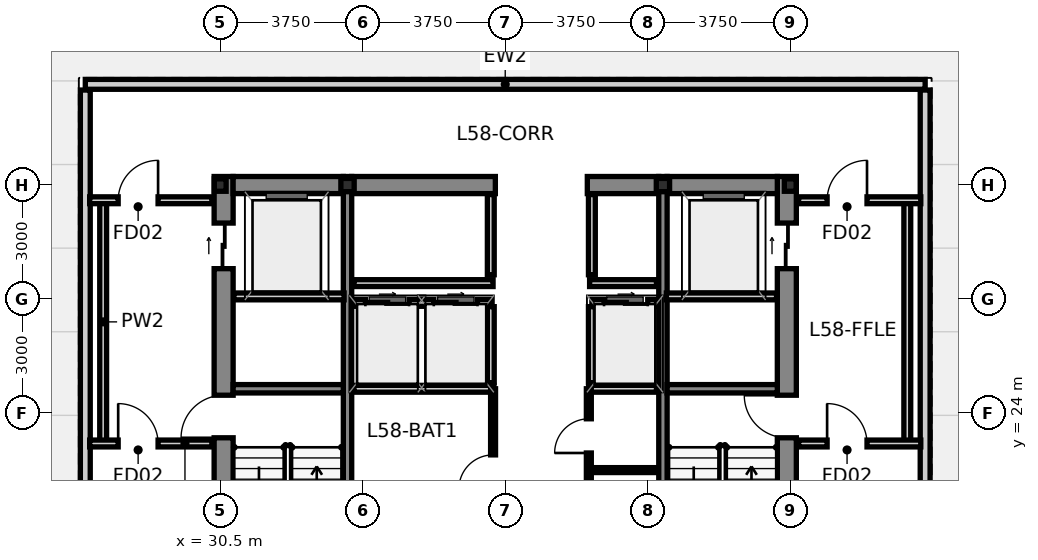
"""IFC4 building model, lengths in metres.
Left out: names, types, materials, properties, quantities, classifications, styles, units other than length and angle.
Written with IfcOpenShell. Run it as: python <this file> out.ifc"""

import sys

from ifc_helpers import new_model, si_unit, direction, frame, frame_2d, origin, origin_2d, place, context, subcontext, project, spatial, rectangle, hollow_rectangle, i_section, extrude, source, transform, mapped, element, fill, save


model = new_model("IFC4")
c1 = context("Model", 3, precision=1e-05, world=origin(), true_north=direction((0.0, 1.0)))
c2 = subcontext(c1, "Body", "Model", "MODEL_VIEW")
j1 = project(units=[si_unit("LENGTHUNIT", "METRE"), si_unit("PLANEANGLEUNIT", "RADIAN")], contexts=[c1])
p1 = place(None, origin())
s1 = spatial("IfcSite", under=j1, at=p1, CompositionType="ELEMENT")
p2 = place(p1, origin())
s2 = spatial("IfcBuilding", under=s1, at=p2, CompositionType="ELEMENT")
p3 = place(p2, frame((0.0, 0.0, 220.55)))
s3 = spatial("IfcBuildingStorey", under=s2, at=p3, CompositionType="ELEMENT", Elevation=220.55)
m1 = source(origin(), c2, "Body", "SweptSolid", [
    extrude(i_section(OverallWidth=0.311, OverallDepth=0.327, WebThickness=0.016, FlangeThickness=0.025, at=origin_2d()), origin(), (0.0, 0.0, 1.0), 4.8),
])
for number, where, z_axis, x_axis in (
    (1, (45.5, 30.0, 0.0), (0.0, 0.0, 1.0), (1.0, 0.0, 0.0)),
    (2, (30.5, 30.0, 0.0), (0.0, 0.0, 1.0), (1.0, 0.0, 0.0)),
):
    element("IfcColumn", number, at=place(p3, frame(where, z_axis=z_axis, x_axis=x_axis)), inside=s3, PredefinedType="COLUMN", context=c2, shape_type="MappedRepresentation", body=[
        mapped(m1, transform((0.0, 0.0, 0.0), scale=1.0)),
    ])
m2 = source(origin(), c2, "Body", "SweptSolid", [
    extrude(hollow_rectangle(XDim=0.35, YDim=0.35, WallThickness=0.016, at=origin_2d()), origin(), (0.0, 0.0, 1.0), 4.8),
])
for number, where, z_axis, x_axis in (
    (3, (33.85, 30.0, 0.0), (0.0, 0.0, 1.0), (1.0, 0.0, 0.0)),
    (4, (42.15, 30.0, 0.0), (0.0, 0.0, 1.0), (1.0, 0.0, 0.0)),
):
    element("IfcColumn", number, at=place(p3, frame(where, z_axis=z_axis, x_axis=x_axis)), inside=s3, PredefinedType="COLUMN", context=c2, shape_type="MappedRepresentation", body=[
        mapped(m2, transform((0.0, 0.0, 0.0), scale=1.0)),
    ])
p4 = place(p3, frame((30.59, 16.95, 0.0), z_axis=(0.0, 0.0, 1.0), x_axis=(0.0, 1.0, 0.0)))
e5 = element("IfcWall", 5, at=p4, inside=s3, PredefinedType="SHEAR", context=c2, shape_type="SweptSolid", body=[
    extrude(rectangle(XDim=13.275, YDim=0.5, at=frame_2d((6.638, 0.0))), origin(), (0.0, 0.0, 1.0), 4.8),
])
p5 = place(p4, frame((6.4, 0.0, 0.0)))
e6 = element("IfcOpeningElement", 6, at=p5, cuts=e5, PredefinedType="OPENING", context=c2, shape_type="SweptSolid", body=[
    extrude(rectangle(XDim=1.12, YDim=2.15, at=frame_2d((0.56, 1.075))), frame((0.0, 0.262, 0.0), z_axis=(0.0, -1.0, 0.0), x_axis=(1.0, 0.0, 0.0)), (0.0, 0.0, 1.0), 0.524),
])
p6 = place(p4, frame((10.85, 0.0, 0.0)))
e7 = element("IfcOpeningElement", 7, at=p6, cuts=e5, PredefinedType="OPENING", context=c2, shape_type="SweptSolid", body=[
    extrude(rectangle(XDim=1.2, YDim=2.2, at=frame_2d((0.6, 1.1))), frame((0.0, 0.262, 0.0), z_axis=(0.0, -1.0, 0.0), x_axis=(1.0, 0.0, 0.0)), (0.0, 0.0, 1.0), 0.524),
])
p7 = place(p3, frame((45.41, 16.95, 0.0), z_axis=(0.0, 0.0, 1.0), x_axis=(0.0, 1.0, 0.0)))
e8 = element("IfcWall", 8, at=p7, inside=s3, PredefinedType="SHEAR", context=c2, shape_type="SweptSolid", body=[
    extrude(rectangle(XDim=13.275, YDim=0.5, at=frame_2d((6.638, 0.0))), origin(), (0.0, 0.0, 1.0), 4.8),
])
p8 = place(p7, frame((6.4, 0.0, 0.0)))
e9 = element("IfcOpeningElement", 9, at=p8, cuts=e8, PredefinedType="OPENING", context=c2, shape_type="SweptSolid", body=[
    extrude(rectangle(XDim=1.12, YDim=2.15, at=frame_2d((0.56, 1.075))), frame((0.0, 0.262, 0.0), z_axis=(0.0, -1.0, 0.0), x_axis=(1.0, 0.0, 0.0)), (0.0, 0.0, 1.0), 0.524),
])
p9 = place(p7, frame((10.85, 0.0, 0.0)))
e10 = element("IfcOpeningElement", 10, at=p9, cuts=e8, PredefinedType="OPENING", context=c2, shape_type="SweptSolid", body=[
    extrude(rectangle(XDim=1.2, YDim=2.2, at=frame_2d((0.6, 1.1))), frame((0.0, 0.262, 0.0), z_axis=(0.0, -1.0, 0.0), x_axis=(1.0, 0.0, 0.0)), (0.0, 0.0, 1.0), 0.524),
])
p10 = place(p3, frame((30.84, 30.0, 0.0), z_axis=(0.0, 0.0, 1.0), x_axis=(1.0, 0.0, 0.0)))
e11 = element("IfcWall", 11, at=p10, inside=s3, PredefinedType="SHEAR", context=c2, shape_type="SweptSolid", body=[
    extrude(rectangle(XDim=2.9, YDim=0.45, at=frame_2d((1.45, 0.0))), origin(), (0.0, 0.0, 1.0), 4.8),
])
p11 = place(p3, frame((33.96, 30.0, 0.0), z_axis=(0.0, 0.0, 1.0), x_axis=(1.0, 0.0, 0.0)))
e12 = element("IfcWall", 12, at=p11, inside=s3, PredefinedType="SHEAR", context=c2, shape_type="SweptSolid", body=[
    extrude(rectangle(XDim=3.78, YDim=0.45, at=frame_2d((1.89, 0.0))), origin(), (0.0, 0.0, 1.0), 4.8),
])
p12 = place(p3, frame((40.16, 30.0, 0.0), z_axis=(0.0, 0.0, 1.0), x_axis=(1.0, 0.0, 0.0)))
e13 = element("IfcWall", 13, at=p12, inside=s3, PredefinedType="SHEAR", context=c2, shape_type="SweptSolid", body=[
    extrude(rectangle(XDim=1.88, YDim=0.45, at=frame_2d((0.94, 0.0))), origin(), (0.0, 0.0, 1.0), 4.8),
])
p13 = place(p3, frame((42.26, 30.0, 0.0), z_axis=(0.0, 0.0, 1.0), x_axis=(1.0, 0.0, 0.0)))
e14 = element("IfcWall", 14, at=p13, inside=s3, PredefinedType="SHEAR", context=c2, shape_type="SweptSolid", body=[
    extrude(rectangle(XDim=2.9, YDim=0.45, at=frame_2d((1.45, 0.0))), origin(), (0.0, 0.0, 1.0), 4.8),
])
for number, where, z_axis, x_axis in (
    (15, (33.85, 16.95, 0.0), (0.0, 0.0, 1.0), (0.0, 1.0, 0.0)),
    (16, (42.15, 16.95, 0.0), (0.0, 0.0, 1.0), (0.0, 1.0, 0.0)),
):
    element("IfcWall", number, at=place(p3, frame(where, z_axis=z_axis, x_axis=x_axis)), inside=s3, PredefinedType="SHEAR", context=c2, shape_type="SweptSolid", body=[
        extrude(rectangle(XDim=13.275, YDim=0.22, at=frame_2d((6.638, 0.0))), origin(), (0.0, 0.0, 1.0), 4.8),
    ])
for number, where, z_axis, x_axis in (
    (17, (30.84, 24.64, 0.0), (0.0, 0.0, 1.0), (1.0, 0.0, 0.0)),
    (18, (42.26, 24.64, 0.0), (0.0, 0.0, 1.0), (1.0, 0.0, 0.0)),
):
    element("IfcWall", number, at=place(p3, frame(where, z_axis=z_axis, x_axis=x_axis)), inside=s3, PredefinedType="SHEAR", context=c2, shape_type="SweptSolid", body=[
        extrude(rectangle(XDim=2.9, YDim=0.22, at=frame_2d((1.45, 0.0))), origin(), (0.0, 0.0, 1.0), 4.8),
    ])
p14 = place(p3, frame((26.95, 32.65, 0.0), z_axis=(0.0, 0.0, 1.0), x_axis=(1.0, 0.0, 0.0)))
e19 = element("IfcWall", 19, at=p14, inside=s3, PredefinedType="STANDARD", context=c2, shape_type="SweptSolid", body=[
    extrude(rectangle(XDim=22.1, YDim=0.26, at=frame_2d((11.05, 0.0))), origin(), (0.0, 0.0, 1.0), 4.228),
])
p15 = place(p3, frame((26.95, 15.5, 0.0), z_axis=(0.0, 0.0, 1.0), x_axis=(0.0, 1.0, 0.0)))
e20 = element("IfcWall", 20, at=p15, inside=s3, PredefinedType="STANDARD", context=c2, shape_type="SweptSolid", body=[
    extrude(rectangle(XDim=17.0, YDim=0.26, at=frame_2d((8.5, 0.0))), origin(), (0.0, 0.0, 1.0), 4.228),
])
p16 = place(p15, frame((3.5, 0.0, 0.0)))
e21 = element("IfcOpeningElement", 21, at=p16, cuts=e20, PredefinedType="OPENING", context=c2, shape_type="SweptSolid", body=[
    extrude(rectangle(XDim=1.1, YDim=2.2, at=frame_2d((0.55, 1.1))), frame((0.0, 0.142, 0.0), z_axis=(0.0, -1.0, 0.0), x_axis=(1.0, 0.0, 0.0)), (0.0, 0.0, 1.0), 0.284),
])
p17 = place(p3, frame((49.05, 15.5, 0.0), z_axis=(0.0, 0.0, 1.0), x_axis=(0.0, 1.0, 0.0)))
e22 = element("IfcWall", 22, at=p17, inside=s3, PredefinedType="STANDARD", context=c2, shape_type="SweptSolid", body=[
    extrude(rectangle(XDim=17.0, YDim=0.26, at=frame_2d((8.5, 0.0))), origin(), (0.0, 0.0, 1.0), 4.228),
])
p18 = place(p17, frame((3.5, 0.0, 0.0)))
e23 = element("IfcOpeningElement", 23, at=p18, cuts=e22, PredefinedType="OPENING", context=c2, shape_type="SweptSolid", body=[
    extrude(rectangle(XDim=1.1, YDim=2.2, at=frame_2d((0.55, 1.1))), frame((0.0, 0.142, 0.0), z_axis=(0.0, -1.0, 0.0), x_axis=(1.0, 0.0, 0.0)), (0.0, 0.0, 1.0), 0.284),
])
p19 = place(p3, frame((34.02, 26.9, 0.0), z_axis=(0.0, 0.0, 1.0), x_axis=(1.0, 0.0, 0.0)))
e24 = element("IfcWall", 24, at=p19, inside=s3, PredefinedType="PARTITIONING", context=c2, shape_type="SweptSolid", body=[
    extrude(rectangle(XDim=3.6, YDim=0.18, at=frame_2d((1.8, 0.0))), origin(), (0.0, 0.0, 1.0), 4.55),
])
p20 = place(p19, frame((0.3, 0.0, 0.0)))
e25 = element("IfcOpeningElement", 25, at=p20, cuts=e24, PredefinedType="OPENING", context=c2, shape_type="SweptSolid", body=[
    extrude(rectangle(XDim=1.15, YDim=2.2, at=frame_2d((0.575, 1.1))), frame((0.0, 0.102, 0.0), z_axis=(0.0, -1.0, 0.0), x_axis=(1.0, 0.0, 0.0)), (0.0, 0.0, 1.0), 0.204),
])
p21 = place(p19, frame((2.1, 0.0, 0.0)))
e26 = element("IfcOpeningElement", 26, at=p21, cuts=e24, PredefinedType="OPENING", context=c2, shape_type="SweptSolid", body=[
    extrude(rectangle(XDim=1.15, YDim=2.2, at=frame_2d((0.575, 1.1))), frame((0.0, 0.102, 0.0), z_axis=(0.0, -1.0, 0.0), x_axis=(1.0, 0.0, 0.0)), (0.0, 0.0, 1.0), 0.204),
])
p22 = place(p3, frame((40.28, 26.9, 0.0), z_axis=(0.0, 0.0, 1.0), x_axis=(1.0, 0.0, 0.0)))
e27 = element("IfcWall", 27, at=p22, inside=s3, PredefinedType="PARTITIONING", context=c2, shape_type="SweptSolid", body=[
    extrude(rectangle(XDim=1.7, YDim=0.18, at=frame_2d((0.85, 0.0))), origin(), (0.0, 0.0, 1.0), 4.55),
])
p23 = place(p22, frame((0.32, 0.0, 0.0)))
e28 = element("IfcOpeningElement", 28, at=p23, cuts=e27, PredefinedType="OPENING", context=c2, shape_type="SweptSolid", body=[
    extrude(rectangle(XDim=1.15, YDim=2.2, at=frame_2d((0.575, 1.1))), frame((0.0, 0.102, 0.0), z_axis=(0.0, -1.0, 0.0), x_axis=(1.0, 0.0, 0.0)), (0.0, 0.0, 1.0), 0.204),
])
for number, where, z_axis, x_axis in (
    (29, (37.62, 24.8, 0.0), (0.0, 0.0, 1.0), (0.0, 1.0, 0.0)),
    (30, (40.28, 24.8, 0.0), (0.0, 0.0, 1.0), (0.0, 1.0, 0.0)),
):
    element("IfcWall", number, at=place(p3, frame(where, z_axis=z_axis, x_axis=x_axis)), inside=s3, PredefinedType="PARTITIONING", context=c2, shape_type="SweptSolid", body=[
        extrude(rectangle(XDim=2.0, YDim=0.18, at=frame_2d((1.0, 0.0))), origin(), (0.0, 0.0, 1.0), 4.55),
    ])
p24 = place(p3, frame((34.02, 24.64, 0.0), z_axis=(0.0, 0.0, 1.0), x_axis=(1.0, 0.0, 0.0)))
e31 = element("IfcWall", 31, at=p24, inside=s3, PredefinedType="PARTITIONING", context=c2, shape_type="SweptSolid", body=[
    extrude(rectangle(XDim=3.68, YDim=0.18, at=frame_2d((1.84, 0.0))), origin(), (0.0, 0.0, 1.0), 4.55),
])
p25 = place(p3, frame((40.2, 24.64, 0.0), z_axis=(0.0, 0.0, 1.0), x_axis=(1.0, 0.0, 0.0)))
e32 = element("IfcWall", 32, at=p25, inside=s3, PredefinedType="PARTITIONING", context=c2, shape_type="SweptSolid", body=[
    extrude(rectangle(XDim=1.78, YDim=0.18, at=frame_2d((0.89, 0.0))), origin(), (0.0, 0.0, 1.0), 4.55),
])
p26 = place(p3, frame((34.02, 27.42, 0.0), z_axis=(0.0, 0.0, 1.0), x_axis=(1.0, 0.0, 0.0)))
e33 = element("IfcWall", 33, at=p26, inside=s3, PredefinedType="PARTITIONING", context=c2, shape_type="SweptSolid", body=[
    extrude(rectangle(XDim=3.66, YDim=0.18, at=frame_2d((1.83, 0.0))), origin(), (0.0, 0.0, 1.0), 4.55),
])
p27 = place(p3, frame((40.22, 27.42, 0.0), z_axis=(0.0, 0.0, 1.0), x_axis=(1.0, 0.0, 0.0)))
e34 = element("IfcWall", 34, at=p27, inside=s3, PredefinedType="PARTITIONING", context=c2, shape_type="SweptSolid", body=[
    extrude(rectangle(XDim=1.76, YDim=0.18, at=frame_2d((0.88, 0.0))), origin(), (0.0, 0.0, 1.0), 4.55),
])
for number, where, z_axis, x_axis in (
    (35, (37.62, 27.64, 0.0), (0.0, 0.0, 1.0), (0.0, 1.0, 0.0)),
    (36, (40.28, 27.64, 0.0), (0.0, 0.0, 1.0), (0.0, 1.0, 0.0)),
):
    element("IfcWall", number, at=place(p3, frame(where, z_axis=z_axis, x_axis=x_axis)), inside=s3, PredefinedType="PARTITIONING", context=c2, shape_type="SweptSolid", body=[
        extrude(rectangle(XDim=2.11, YDim=0.18, at=frame_2d((1.055, 0.0))), origin(), (0.0, 0.0, 1.0), 4.55),
    ])
p28 = place(p3, frame((27.42, 23.2, 0.0), z_axis=(0.0, 0.0, 1.0), x_axis=(0.0, 1.0, 0.0)))
e37 = element("IfcWall", 37, at=p28, inside=s3, PredefinedType="PARTITIONING", context=c2, shape_type="SweptSolid", body=[
    extrude(rectangle(XDim=6.4, YDim=0.18, at=frame_2d((3.2, 0.0))), origin(), (0.0, 0.0, 1.0), 4.228),
])
p29 = place(p3, frame((27.065, 23.2, 0.0), z_axis=(0.0, 0.0, 1.0), x_axis=(1.0, 0.0, 0.0)))
e38 = element("IfcWall", 38, at=p29, inside=s3, PredefinedType="PARTITIONING", context=c2, shape_type="SweptSolid", body=[
    extrude(rectangle(XDim=3.215, YDim=0.18, at=frame_2d((1.607, 0.0))), origin(), (0.0, 0.0, 1.0), 4.55),
])
p30 = place(p29, frame((0.75, 0.0, 0.0)))
e39 = element("IfcOpeningElement", 39, at=p30, cuts=e38, PredefinedType="OPENING", context=c2, shape_type="SweptSolid", body=[
    extrude(rectangle(XDim=1.05, YDim=2.15, at=frame_2d((0.525, 1.075))), frame((0.0, 0.102, 0.0), z_axis=(0.0, -1.0, 0.0), x_axis=(1.0, 0.0, 0.0)), (0.0, 0.0, 1.0), 0.204),
])
p31 = place(p3, frame((27.065, 29.6, 0.0), z_axis=(0.0, 0.0, 1.0), x_axis=(1.0, 0.0, 0.0)))
e40 = element("IfcWall", 40, at=p31, inside=s3, PredefinedType="PARTITIONING", context=c2, shape_type="SweptSolid", body=[
    extrude(rectangle(XDim=3.215, YDim=0.18, at=frame_2d((1.607, 0.0))), origin(), (0.0, 0.0, 1.0), 4.074),
])
p32 = place(p31, frame((0.75, 0.0, 0.0)))
e41 = element("IfcOpeningElement", 41, at=p32, cuts=e40, PredefinedType="OPENING", context=c2, shape_type="SweptSolid", body=[
    extrude(rectangle(XDim=1.05, YDim=2.15, at=frame_2d((0.525, 1.075))), frame((0.0, 0.102, 0.0), z_axis=(0.0, -1.0, 0.0), x_axis=(1.0, 0.0, 0.0)), (0.0, 0.0, 1.0), 0.204),
])
p33 = place(p3, frame((48.58, 23.2, 0.0), z_axis=(0.0, 0.0, 1.0), x_axis=(0.0, 1.0, 0.0)))
e42 = element("IfcWall", 42, at=p33, inside=s3, PredefinedType="PARTITIONING", context=c2, shape_type="SweptSolid", body=[
    extrude(rectangle(XDim=6.4, YDim=0.18, at=frame_2d((3.2, 0.0))), origin(), (0.0, 0.0, 1.0), 4.228),
])
p34 = place(p3, frame((45.72, 23.2, 0.0), z_axis=(0.0, 0.0, 1.0), x_axis=(1.0, 0.0, 0.0)))
e43 = element("IfcWall", 43, at=p34, inside=s3, PredefinedType="PARTITIONING", context=c2, shape_type="SweptSolid", body=[
    extrude(rectangle(XDim=3.215, YDim=0.18, at=frame_2d((1.607, 0.0))), origin(), (0.0, 0.0, 1.0), 4.55),
])
p35 = place(p34, frame((0.75, 0.0, 0.0)))
e44 = element("IfcOpeningElement", 44, at=p35, cuts=e43, PredefinedType="OPENING", context=c2, shape_type="SweptSolid", body=[
    extrude(rectangle(XDim=1.05, YDim=2.15, at=frame_2d((0.525, 1.075))), frame((0.0, 0.102, 0.0), z_axis=(0.0, -1.0, 0.0), x_axis=(1.0, 0.0, 0.0)), (0.0, 0.0, 1.0), 0.204),
])
p36 = place(p3, frame((45.72, 29.6, 0.0), z_axis=(0.0, 0.0, 1.0), x_axis=(1.0, 0.0, 0.0)))
e45 = element("IfcWall", 45, at=p36, inside=s3, PredefinedType="PARTITIONING", context=c2, shape_type="SweptSolid", body=[
    extrude(rectangle(XDim=3.215, YDim=0.18, at=frame_2d((1.607, 0.0))), origin(), (0.0, 0.0, 1.0), 4.074),
])
p37 = place(p36, frame((0.75, 0.0, 0.0)))
e46 = element("IfcOpeningElement", 46, at=p37, cuts=e45, PredefinedType="OPENING", context=c2, shape_type="SweptSolid", body=[
    extrude(rectangle(XDim=1.05, YDim=2.15, at=frame_2d((0.525, 1.075))), frame((0.0, 0.102, 0.0), z_axis=(0.0, -1.0, 0.0), x_axis=(1.0, 0.0, 0.0)), (0.0, 0.0, 1.0), 0.204),
])
for number, where, z_axis, x_axis in (
    (47, (30.86, 27.07, 0.0), (0.0, 0.0, 1.0), (1.0, 0.0, 0.0)),
    (48, (42.24, 27.07, 0.0), (0.0, 0.0, 1.0), (1.0, 0.0, 0.0)),
):
    element("IfcWall", number, at=place(p3, frame(where, z_axis=z_axis, x_axis=x_axis)), inside=s3, PredefinedType="PARTITIONING", context=c2, shape_type="SweptSolid", body=[
        extrude(rectangle(XDim=2.9, YDim=0.18, at=frame_2d((1.45, 0.0))), origin(), (0.0, 0.0, 1.0), 4.55),
    ])
p38 = place(p3, frame((40.28, 22.5, 0.0), z_axis=(0.0, 0.0, 1.0), x_axis=(1.0, 0.0, 0.0)))
e49 = element("IfcWall", 49, at=p38, inside=s3, PredefinedType="PARTITIONING", context=c2, shape_type="SweptSolid", body=[
    extrude(rectangle(XDim=1.7, YDim=0.13, at=frame_2d((0.85, 0.0))), origin(), (0.0, 0.0, 1.0), 4.55),
])
p39 = place(p3, frame((37.68, 20.5, 0.0), z_axis=(0.0, 0.0, 1.0), x_axis=(0.0, 1.0, 0.0)))
e50 = element("IfcWall", 50, at=p39, inside=s3, PredefinedType="PARTITIONING", context=c2, shape_type="SweptSolid", body=[
    extrude(rectangle(XDim=4.14, YDim=0.13, at=frame_2d((2.07, 0.0))), origin(), (0.0, 0.0, 1.0), 4.55),
])
p40 = place(p39, frame((1.5, 0.0, 0.0)))
e51 = element("IfcOpeningElement", 51, at=p40, cuts=e50, PredefinedType="OPENING", context=c2, shape_type="SweptSolid", body=[
    extrude(rectangle(XDim=0.9, YDim=2.1, at=frame_2d((0.45, 1.05))), frame((0.0, 0.077, 0.0), z_axis=(0.0, -1.0, 0.0), x_axis=(1.0, 0.0, 0.0)), (0.0, 0.0, 1.0), 0.154),
])
p41 = place(p3, frame((40.2, 20.5, 0.0), z_axis=(0.0, 0.0, 1.0), x_axis=(0.0, 1.0, 0.0)))
e52 = element("IfcWall", 52, at=p41, inside=s3, PredefinedType="PARTITIONING", context=c2, shape_type="SweptSolid", body=[
    extrude(rectangle(XDim=4.14, YDim=0.13, at=frame_2d((2.07, 0.0))), origin(), (0.0, 0.0, 1.0), 4.55),
])
p42 = place(p41, frame((0.42, 0.0, 0.0)))
e53 = element("IfcOpeningElement", 53, at=p42, cuts=e52, PredefinedType="OPENING", context=c2, shape_type="SweptSolid", body=[
    extrude(rectangle(XDim=0.9, YDim=2.1, at=frame_2d((0.45, 1.05))), frame((0.0, 0.077, 0.0), z_axis=(0.0, -1.0, 0.0), x_axis=(1.0, 0.0, 0.0)), (0.0, 0.0, 1.0), 0.154),
])
p43 = place(p41, frame((2.45, 0.0, 0.0)))
e54 = element("IfcOpeningElement", 54, at=p43, cuts=e52, PredefinedType="OPENING", context=c2, shape_type="SweptSolid", body=[
    extrude(rectangle(XDim=0.9, YDim=2.1, at=frame_2d((0.45, 1.05))), frame((0.0, 0.077, 0.0), z_axis=(0.0, -1.0, 0.0), x_axis=(1.0, 0.0, 0.0)), (0.0, 0.0, 1.0), 0.154),
])
p44 = place(p5, origin())
e55 = element("IfcDoor", 55, at=p44, inside=s3, OperationType="SINGLE_SWING_LEFT", PredefinedType="DOOR", context=c2, shape_type="SweptSolid", body=[
    extrude(rectangle(XDim=1.12, YDim=2.15, at=frame_2d((0.56, 1.075))), frame((0.0, 0.025, 0.0), z_axis=(0.0, -1.0, 0.0), x_axis=(1.0, 0.0, 0.0)), (0.0, 0.0, 1.0), 0.05),
])
fill(e6, e55)
p45 = place(p6, origin())
e56 = element("IfcDoor", 56, at=p45, inside=s3, OperationType="SLIDING_TO_LEFT", PredefinedType="DOOR", context=c2, shape_type="SweptSolid", body=[
    extrude(rectangle(XDim=1.2, YDim=2.2, at=frame_2d((0.6, 1.1))), frame((0.0, 0.025, 0.0), z_axis=(0.0, -1.0, 0.0), x_axis=(1.0, 0.0, 0.0)), (0.0, 0.0, 1.0), 0.05),
])
fill(e7, e56)
p46 = place(p8, origin())
e57 = element("IfcDoor", 57, at=p46, inside=s3, OperationType="SINGLE_SWING_RIGHT", PredefinedType="DOOR", context=c2, shape_type="SweptSolid", body=[
    extrude(rectangle(XDim=1.12, YDim=2.15, at=frame_2d((0.56, 1.075))), frame((0.0, 0.025, 0.0), z_axis=(0.0, -1.0, 0.0), x_axis=(1.0, 0.0, 0.0)), (0.0, 0.0, 1.0), 0.05),
])
fill(e9, e57)
p47 = place(p9, origin())
e58 = element("IfcDoor", 58, at=p47, inside=s3, OperationType="SLIDING_TO_RIGHT", PredefinedType="DOOR", context=c2, shape_type="SweptSolid", body=[
    extrude(rectangle(XDim=1.2, YDim=2.2, at=frame_2d((0.6, 1.1))), frame((0.0, 0.025, 0.0), z_axis=(0.0, -1.0, 0.0), x_axis=(1.0, 0.0, 0.0)), (0.0, 0.0, 1.0), 0.05),
])
fill(e10, e58)
p48 = place(p20, origin())
e59 = element("IfcDoor", 59, at=p48, inside=s3, OperationType="SLIDING_TO_LEFT", PredefinedType="DOOR", context=c2, shape_type="SweptSolid", body=[
    extrude(rectangle(XDim=1.15, YDim=2.2, at=frame_2d((0.575, 1.1))), frame((0.0, 0.025, 0.0), z_axis=(0.0, -1.0, 0.0), x_axis=(1.0, 0.0, 0.0)), (0.0, 0.0, 1.0), 0.05),
])
fill(e25, e59)
p49 = place(p21, origin())
e60 = element("IfcDoor", 60, at=p49, inside=s3, OperationType="SLIDING_TO_RIGHT", PredefinedType="DOOR", context=c2, shape_type="SweptSolid", body=[
    extrude(rectangle(XDim=1.15, YDim=2.2, at=frame_2d((0.575, 1.1))), frame((0.0, 0.025, 0.0), z_axis=(0.0, -1.0, 0.0), x_axis=(1.0, 0.0, 0.0)), (0.0, 0.0, 1.0), 0.05),
])
fill(e26, e60)
p50 = place(p23, origin())
e61 = element("IfcDoor", 61, at=p50, inside=s3, OperationType="SLIDING_TO_LEFT", PredefinedType="DOOR", context=c2, shape_type="SweptSolid", body=[
    extrude(rectangle(XDim=1.15, YDim=2.2, at=frame_2d((0.575, 1.1))), frame((0.0, 0.025, 0.0), z_axis=(0.0, -1.0, 0.0), x_axis=(1.0, 0.0, 0.0)), (0.0, 0.0, 1.0), 0.05),
])
fill(e28, e61)
p51 = place(p30, origin())
e62 = element("IfcDoor", 62, at=p51, inside=s3, OperationType="SINGLE_SWING_LEFT", PredefinedType="DOOR", context=c2, shape_type="SweptSolid", body=[
    extrude(rectangle(XDim=1.05, YDim=2.15, at=frame_2d((0.525, 1.075))), frame((0.0, 0.025, 0.0), z_axis=(0.0, -1.0, 0.0), x_axis=(1.0, 0.0, 0.0)), (0.0, 0.0, 1.0), 0.05),
])
fill(e39, e62)
p52 = place(p32, origin())
e63 = element("IfcDoor", 63, at=p52, inside=s3, OperationType="SINGLE_SWING_RIGHT", PredefinedType="DOOR", context=c2, shape_type="SweptSolid", body=[
    extrude(rectangle(XDim=1.05, YDim=2.15, at=frame_2d((0.525, 1.075))), frame((0.0, 0.025, 0.0), z_axis=(0.0, -1.0, 0.0), x_axis=(1.0, 0.0, 0.0)), (0.0, 0.0, 1.0), 0.05),
])
fill(e41, e63)
p53 = place(p35, origin())
e64 = element("IfcDoor", 64, at=p53, inside=s3, OperationType="SINGLE_SWING_LEFT", PredefinedType="DOOR", context=c2, shape_type="SweptSolid", body=[
    extrude(rectangle(XDim=1.05, YDim=2.15, at=frame_2d((0.525, 1.075))), frame((0.0, 0.025, 0.0), z_axis=(0.0, -1.0, 0.0), x_axis=(1.0, 0.0, 0.0)), (0.0, 0.0, 1.0), 0.05),
])
fill(e44, e64)
p54 = place(p37, origin())
e65 = element("IfcDoor", 65, at=p54, inside=s3, OperationType="SINGLE_SWING_RIGHT", PredefinedType="DOOR", context=c2, shape_type="SweptSolid", body=[
    extrude(rectangle(XDim=1.05, YDim=2.15, at=frame_2d((0.525, 1.075))), frame((0.0, 0.025, 0.0), z_axis=(0.0, -1.0, 0.0), x_axis=(1.0, 0.0, 0.0)), (0.0, 0.0, 1.0), 0.05),
])
fill(e46, e65)
p55 = place(p40, origin())
e66 = element("IfcDoor", 66, at=p55, inside=s3, OperationType="SINGLE_SWING_LEFT", PredefinedType="DOOR", context=c2, shape_type="SweptSolid", body=[
    extrude(rectangle(XDim=0.9, YDim=2.1, at=frame_2d((0.45, 1.05))), frame((0.0, 0.025, 0.0), z_axis=(0.0, -1.0, 0.0), x_axis=(1.0, 0.0, 0.0)), (0.0, 0.0, 1.0), 0.05),
])
fill(e51, e66)
p56 = place(p43, origin())
e67 = element("IfcDoor", 67, at=p56, inside=s3, OperationType="SINGLE_SWING_LEFT", PredefinedType="DOOR", context=c2, shape_type="SweptSolid", body=[
    extrude(rectangle(XDim=0.9, YDim=2.1, at=frame_2d((0.45, 1.05))), frame((0.0, 0.025, 0.0), z_axis=(0.0, -1.0, 0.0), x_axis=(1.0, 0.0, 0.0)), (0.0, 0.0, 1.0), 0.05),
])
fill(e54, e67)
save(model, sys.argv[1])
